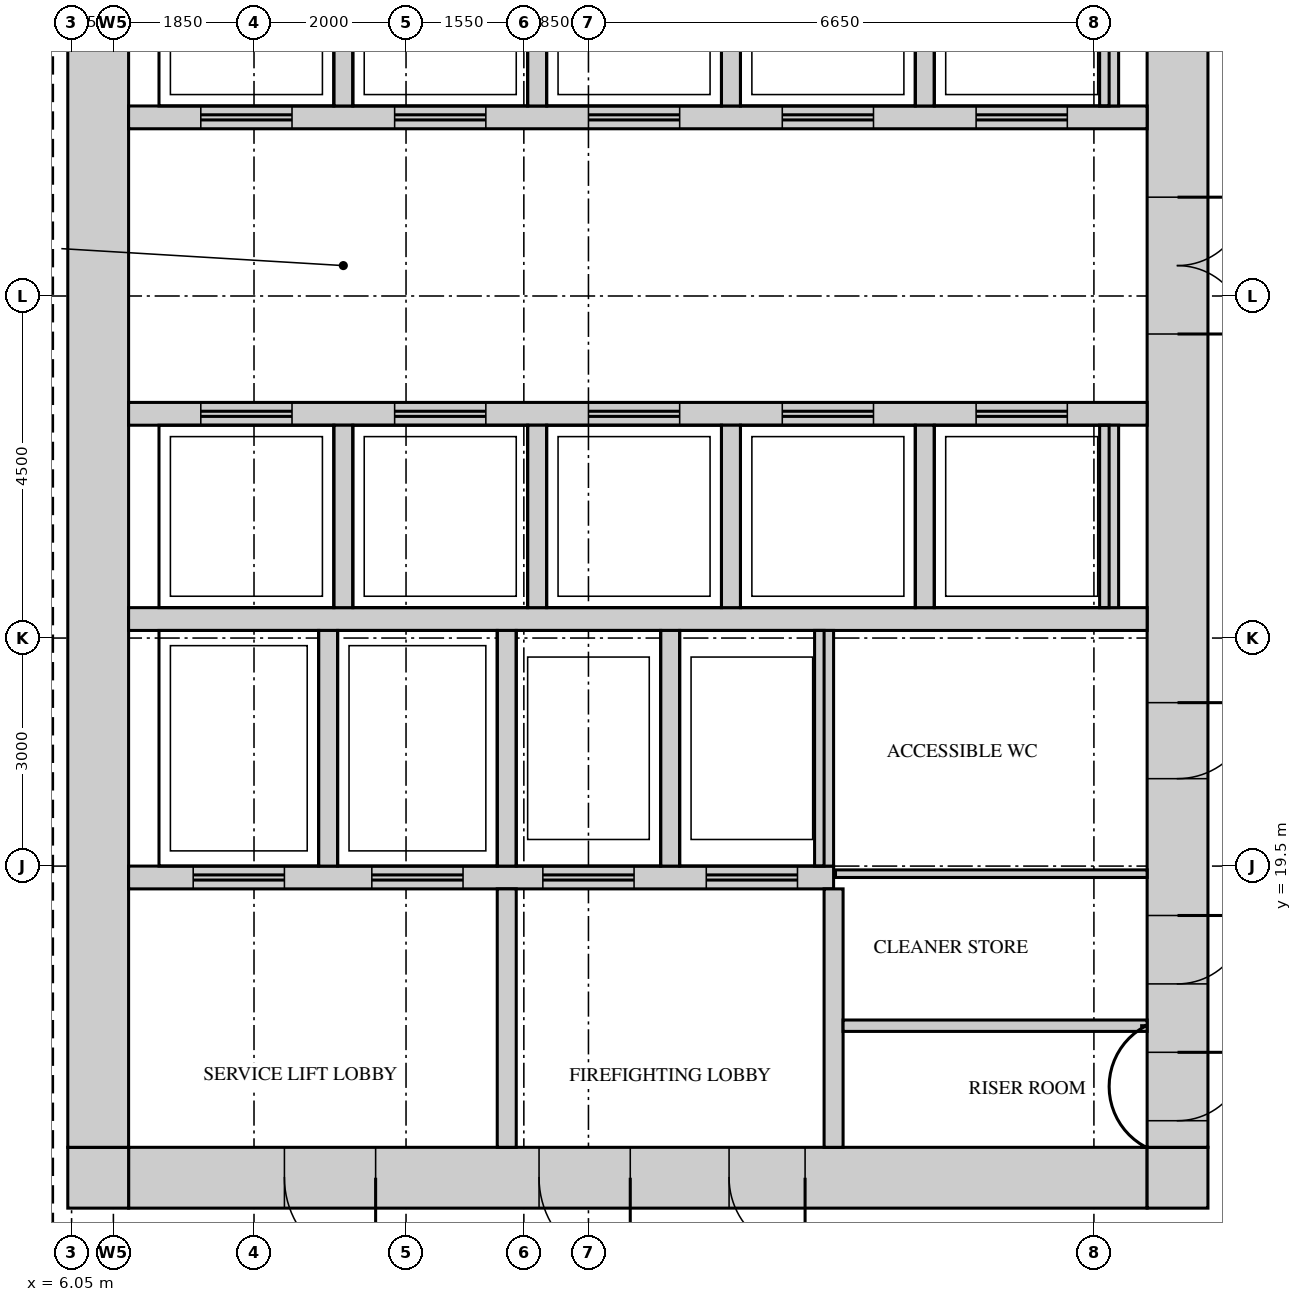
"""IFC4 building model, lengths in metres.
Left out: names, types, materials, properties, quantities, classifications, styles, units other than length and angle.
Written with IfcOpenShell. Run it as: python <this file> out.ifc"""

import sys

from ifc_helpers import new_model, si_unit, direction, frame, frame_2d, origin, place, context, subcontext, project, spatial, rectangle, extrude, source, transform, mapped, element, fill, save


model = new_model("IFC4")
c1 = context("Model", 3, precision=1e-05, world=origin(), true_north=direction((0.0, 1.0)))
c2 = subcontext(c1, "Body", "Model", "MODEL_VIEW")
j1 = project(units=[si_unit("LENGTHUNIT", "METRE"), si_unit("PLANEANGLEUNIT", "RADIAN")], contexts=[c1])
p1 = place(None, origin())
s1 = spatial("IfcSite", under=j1, at=p1, CompositionType="ELEMENT")
p2 = place(p1, origin())
s2 = spatial("IfcBuilding", under=s1, at=p2, CompositionType="ELEMENT")
p3 = place(p2, frame((0.0, 0.0, 188.7)))
s3 = spatial("IfcBuildingStorey", under=s2, at=p3, CompositionType="ELEMENT", Elevation=188.7)
m1 = source(origin(), c2, "Body", "SweptSolid", [
    extrude(rectangle(XDim=13.4, YDim=0.8, at=frame_2d((6.7, 0.0))), origin(), (0.0, 0.0, 1.0), 3.75),
])
p4 = place(p3, frame((6.8, 15.4, 0.0), z_axis=(0.0, 0.0, 1.0), x_axis=(1.0, 0.0, 0.0)))
e1 = element("IfcWall", 1, at=p4, inside=s3, PredefinedType="SHEAR", context=c2, shape_type="MappedRepresentation", body=[
    mapped(m1, transform((0.0, 0.0, 0.0))),
])
m2 = source(origin(), c2, "Body", "SweptSolid", [
    extrude(rectangle(XDim=1.2, YDim=2.1, at=frame_2d((0.6, 1.05))), frame((0.0, 0.41, 0.0), z_axis=(0.0, -1.0, 0.0), x_axis=(1.0, 0.0, 0.0)), (0.0, 0.0, 1.0), 0.82),
])
p5 = place(p4, frame((5.4, 0.0, 0.0)))
e2 = element("IfcOpeningElement", 2, at=p5, cuts=e1, PredefinedType="OPENING", context=c2, shape_type="MappedRepresentation", body=[
    mapped(m2, transform((0.0, 0.0, 0.0))),
])
p6 = place(p4, frame((2.05, 0.0, 0.0)))
e3 = element("IfcOpeningElement", 3, at=p6, cuts=e1, PredefinedType="OPENING", context=c2, shape_type="MappedRepresentation", body=[
    mapped(m2, transform((0.0, 0.0, 0.0))),
])
m3 = source(origin(), c2, "Body", "SweptSolid", [
    extrude(rectangle(XDim=1.0, YDim=2.1, at=frame_2d((0.5, 1.05))), frame((0.0, 0.41, 0.0), z_axis=(0.0, -1.0, 0.0), x_axis=(1.0, 0.0, 0.0)), (0.0, 0.0, 1.0), 0.82),
])
p7 = place(p4, frame((7.9, 0.0, 0.0)))
e4 = element("IfcOpeningElement", 4, at=p7, cuts=e1, PredefinedType="OPENING", context=c2, shape_type="MappedRepresentation", body=[
    mapped(m3, transform((0.0, 0.0, 0.0))),
])
m4 = source(origin(), c2, "Body", "SweptSolid", [
    extrude(rectangle(XDim=0.8, YDim=0.8, at=frame_2d((0.4, 0.0))), origin(), (0.0, 0.0, 1.0), 3.75),
])
for number, where, z_axis, x_axis in (
    (5, (20.2, 15.4, 0.0), (0.0, 0.0, 1.0), (1.0, 0.0, 0.0)),
    (6, (6.0, 15.4, 0.0), (0.0, 0.0, 1.0), (1.0, 0.0, 0.0)),
):
    element("IfcWall", number, at=place(p3, frame(where, z_axis=z_axis, x_axis=x_axis)), inside=s3, PredefinedType="SHEAR", context=c2, shape_type="MappedRepresentation", body=[
        mapped(m4, transform((0.0, 0.0, 0.0))),
    ])
m5 = source(origin(), c2, "Body", "SweptSolid", [
    extrude(rectangle(XDim=22.4, YDim=0.8, at=frame_2d((11.2, 0.0))), origin(), (0.0, 0.0, 1.0), 3.75),
])
p8 = place(p3, frame((20.6, 15.8, 0.0), z_axis=(0.0, 0.0, 1.0), x_axis=(0.0, 1.0, 0.0)))
e7 = element("IfcWall", 7, at=p8, inside=s3, PredefinedType="SHEAR", context=c2, shape_type="MappedRepresentation", body=[
    mapped(m5, transform((0.0, 0.0, 0.0))),
])
m6 = source(origin(), c2, "Body", "SweptSolid", [
    extrude(rectangle(XDim=1.8, YDim=2.1, at=frame_2d((0.9, 1.05))), frame((0.0, 0.41, 0.0), z_axis=(0.0, -1.0, 0.0), x_axis=(1.0, 0.0, 0.0)), (0.0, 0.0, 1.0), 0.82),
])
p9 = place(p8, frame((10.7, 0.0, 0.0)))
e8 = element("IfcOpeningElement", 8, at=p9, cuts=e7, PredefinedType="OPENING", context=c2, shape_type="MappedRepresentation", body=[
    mapped(m6, transform((0.0, 0.0, 0.0))),
])
m7 = source(origin(), c2, "Body", "SweptSolid", [
    extrude(rectangle(XDim=0.9, YDim=2.1, at=frame_2d((0.45, 1.05))), frame((0.0, 0.41, 0.0), z_axis=(0.0, -1.0, 0.0), x_axis=(1.0, 0.0, 0.0)), (0.0, 0.0, 1.0), 0.82),
])
p10 = place(p8, frame((0.35, 0.0, 0.0)))
e9 = element("IfcOpeningElement", 9, at=p10, cuts=e7, PredefinedType="OPENING", context=c2, shape_type="MappedRepresentation", body=[
    mapped(m7, transform((0.0, 0.0, 0.0))),
])
p11 = place(p8, frame((2.15, 0.0, 0.0)))
e10 = element("IfcOpeningElement", 10, at=p11, cuts=e7, PredefinedType="OPENING", context=c2, shape_type="MappedRepresentation", body=[
    mapped(m7, transform((0.0, 0.0, 0.0))),
])
p12 = place(p8, frame((4.85, 0.0, 0.0)))
e11 = element("IfcOpeningElement", 11, at=p12, cuts=e7, PredefinedType="OPENING", context=c2, shape_type="MappedRepresentation", body=[
    mapped(m3, transform((0.0, 0.0, 0.0))),
])
p13 = place(p3, frame((6.4, 15.8, 0.0), z_axis=(0.0, 0.0, 1.0), x_axis=(0.0, 1.0, 0.0)))
e12 = element("IfcWall", 12, at=p13, inside=s3, PredefinedType="SHEAR", context=c2, shape_type="MappedRepresentation", body=[
    mapped(m5, transform((0.0, 0.0, 0.0))),
])
m8 = source(origin(), c2, "Body", "SweptSolid", [
    extrude(rectangle(XDim=13.4, YDim=0.3, at=frame_2d((6.7, 0.0))), origin(), (0.0, 0.0, 1.0), 3.75),
])
p14 = place(p3, frame((6.8, 22.75, 0.0), z_axis=(0.0, 0.0, 1.0), x_axis=(1.0, 0.0, 0.0)))
e13 = element("IfcWall", 13, at=p14, inside=s3, PredefinedType="STANDARD", context=c2, shape_type="MappedRepresentation", body=[
    mapped(m8, transform((0.0, 0.0, 0.0))),
])
m9 = source(origin(), c2, "Body", "SweptSolid", [
    extrude(rectangle(XDim=9.275, YDim=0.3, at=frame_2d((4.637, 0.0))), origin(), (0.0, 0.0, 1.0), 3.75),
])
p15 = place(p3, frame((6.8, 19.35, 0.0), z_axis=(0.0, 0.0, 1.0), x_axis=(1.0, 0.0, 0.0)))
e14 = element("IfcWall", 14, at=p15, inside=s3, PredefinedType="STANDARD", context=c2, shape_type="MappedRepresentation", body=[
    mapped(m9, transform((0.0, 0.0, 0.0))),
])
m10 = source(origin(), c2, "Body", "SweptSolid", [
    extrude(rectangle(XDim=1.2, YDim=2.1, at=frame_2d((0.6, 1.05))), frame((0.0, 0.16, 0.0), z_axis=(0.0, -1.0, 0.0), x_axis=(1.0, 0.0, 0.0)), (0.0, 0.0, 1.0), 0.32),
])
p16 = place(p15, frame((0.85, 0.0, 0.0)))
e15 = element("IfcOpeningElement", 15, at=p16, cuts=e14, PredefinedType="OPENING", context=c2, shape_type="MappedRepresentation", body=[
    mapped(m10, transform((0.0, 0.0, 0.0))),
])
p17 = place(p15, frame((3.2, 0.0, 0.0)))
e16 = element("IfcOpeningElement", 16, at=p17, cuts=e14, PredefinedType="OPENING", context=c2, shape_type="MappedRepresentation", body=[
    mapped(m10, transform((0.0, 0.0, 0.0))),
])
p18 = place(p15, frame((5.45, 0.0, 0.0)))
e17 = element("IfcOpeningElement", 17, at=p18, cuts=e14, PredefinedType="OPENING", context=c2, shape_type="MappedRepresentation", body=[
    mapped(m10, transform((0.0, 0.0, 0.0))),
])
p19 = place(p15, frame((7.6, 0.0, 0.0)))
e18 = element("IfcOpeningElement", 18, at=p19, cuts=e14, PredefinedType="OPENING", context=c2, shape_type="MappedRepresentation", body=[
    mapped(m10, transform((0.0, 0.0, 0.0))),
])
p20 = place(p3, frame((6.8, 29.35, 0.0), z_axis=(0.0, 0.0, 1.0), x_axis=(1.0, 0.0, 0.0)))
e19 = element("IfcWall", 19, at=p20, inside=s3, PredefinedType="STANDARD", context=c2, shape_type="MappedRepresentation", body=[
    mapped(m8, transform((0.0, 0.0, 0.0))),
])
p21 = place(p20, frame((0.95, 0.0, 0.0)))
e20 = element("IfcOpeningElement", 20, at=p21, cuts=e19, PredefinedType="OPENING", context=c2, shape_type="MappedRepresentation", body=[
    mapped(m10, transform((0.0, 0.0, 0.0))),
])
p22 = place(p20, frame((3.5, 0.0, 0.0)))
e21 = element("IfcOpeningElement", 21, at=p22, cuts=e19, PredefinedType="OPENING", context=c2, shape_type="MappedRepresentation", body=[
    mapped(m10, transform((0.0, 0.0, 0.0))),
])
p23 = place(p20, frame((6.05, 0.0, 0.0)))
e22 = element("IfcOpeningElement", 22, at=p23, cuts=e19, PredefinedType="OPENING", context=c2, shape_type="MappedRepresentation", body=[
    mapped(m10, transform((0.0, 0.0, 0.0))),
])
p24 = place(p20, frame((8.6, 0.0, 0.0)))
e23 = element("IfcOpeningElement", 23, at=p24, cuts=e19, PredefinedType="OPENING", context=c2, shape_type="MappedRepresentation", body=[
    mapped(m10, transform((0.0, 0.0, 0.0))),
])
p25 = place(p20, frame((11.15, 0.0, 0.0)))
e24 = element("IfcOpeningElement", 24, at=p25, cuts=e19, PredefinedType="OPENING", context=c2, shape_type="MappedRepresentation", body=[
    mapped(m10, transform((0.0, 0.0, 0.0))),
])
p26 = place(p3, frame((6.8, 25.45, 0.0), z_axis=(0.0, 0.0, 1.0), x_axis=(1.0, 0.0, 0.0)))
e25 = element("IfcWall", 25, at=p26, inside=s3, PredefinedType="STANDARD", context=c2, shape_type="MappedRepresentation", body=[
    mapped(m8, transform((0.0, 0.0, 0.0))),
])
p27 = place(p26, frame((0.95, 0.0, 0.0)))
e26 = element("IfcOpeningElement", 26, at=p27, cuts=e25, PredefinedType="OPENING", context=c2, shape_type="MappedRepresentation", body=[
    mapped(m10, transform((0.0, 0.0, 0.0))),
])
p28 = place(p26, frame((3.5, 0.0, 0.0)))
e27 = element("IfcOpeningElement", 27, at=p28, cuts=e25, PredefinedType="OPENING", context=c2, shape_type="MappedRepresentation", body=[
    mapped(m10, transform((0.0, 0.0, 0.0))),
])
p29 = place(p26, frame((6.05, 0.0, 0.0)))
e28 = element("IfcOpeningElement", 28, at=p29, cuts=e25, PredefinedType="OPENING", context=c2, shape_type="MappedRepresentation", body=[
    mapped(m10, transform((0.0, 0.0, 0.0))),
])
p30 = place(p26, frame((8.6, 0.0, 0.0)))
e29 = element("IfcOpeningElement", 29, at=p30, cuts=e25, PredefinedType="OPENING", context=c2, shape_type="MappedRepresentation", body=[
    mapped(m10, transform((0.0, 0.0, 0.0))),
])
p31 = place(p26, frame((11.15, 0.0, 0.0)))
e30 = element("IfcOpeningElement", 30, at=p31, cuts=e25, PredefinedType="OPENING", context=c2, shape_type="MappedRepresentation", body=[
    mapped(m10, transform((0.0, 0.0, 0.0))),
])
m11 = source(origin(), c2, "Body", "SweptSolid", [
    extrude(rectangle(XDim=3.1, YDim=0.25, at=frame_2d((1.55, 0.0))), origin(), (0.0, 0.0, 1.0), 3.75),
])
for number, where, z_axis, x_axis in (
    (31, (9.425, 19.5, 0.0), (0.0, 0.0, 1.0), (0.0, 1.0, 0.0)),
    (32, (11.775, 19.5, 0.0), (0.0, 0.0, 1.0), (0.0, 1.0, 0.0)),
    (33, (13.925, 19.5, 0.0), (0.0, 0.0, 1.0), (0.0, 1.0, 0.0)),
    (34, (15.95, 19.5, 0.0), (0.0, 0.0, 1.0), (0.0, 1.0, 0.0)),
):
    element("IfcWall", number, at=place(p3, frame(where, z_axis=z_axis, x_axis=x_axis)), inside=s3, PredefinedType="STANDARD", context=c2, shape_type="MappedRepresentation", body=[
        mapped(m11, transform((0.0, 0.0, 0.0))),
    ])
m12 = source(origin(), c2, "Body", "SweptSolid", [
    extrude(rectangle(XDim=2.4, YDim=0.25, at=frame_2d((1.2, 0.0))), origin(), (0.0, 0.0, 1.0), 3.75),
])
for number, where, z_axis, x_axis in (
    (35, (17.275, 29.5, 0.0), (0.0, 0.0, 1.0), (0.0, 1.0, 0.0)),
    (36, (19.7, 29.5, 0.0), (0.0, 0.0, 1.0), (0.0, 1.0, 0.0)),
    (37, (9.625, 29.5, 0.0), (0.0, 0.0, 1.0), (0.0, 1.0, 0.0)),
    (38, (12.175, 29.5, 0.0), (0.0, 0.0, 1.0), (0.0, 1.0, 0.0)),
    (39, (14.725, 29.5, 0.0), (0.0, 0.0, 1.0), (0.0, 1.0, 0.0)),
):
    element("IfcWall", number, at=place(p3, frame(where, z_axis=z_axis, x_axis=x_axis)), inside=s3, PredefinedType="STANDARD", context=c2, shape_type="MappedRepresentation", body=[
        mapped(m12, transform((0.0, 0.0, 0.0))),
    ])
m13 = source(origin(), c2, "Body", "SweptSolid", [
    extrude(rectangle(XDim=2.4, YDim=0.25, at=frame_2d((1.2, 0.0))), origin(), (0.0, 0.0, 1.0), 3.75),
])
for number, where, z_axis, x_axis in (
    (40, (17.275, 22.9, 0.0), (0.0, 0.0, 1.0), (0.0, 1.0, 0.0)),
    (41, (19.7, 22.9, 0.0), (0.0, 0.0, 1.0), (0.0, 1.0, 0.0)),
    (42, (9.625, 22.9, 0.0), (0.0, 0.0, 1.0), (0.0, 1.0, 0.0)),
    (43, (12.175, 22.9, 0.0), (0.0, 0.0, 1.0), (0.0, 1.0, 0.0)),
    (44, (14.725, 22.9, 0.0), (0.0, 0.0, 1.0), (0.0, 1.0, 0.0)),
):
    element("IfcWall", number, at=place(p3, frame(where, z_axis=z_axis, x_axis=x_axis)), inside=s3, PredefinedType="STANDARD", context=c2, shape_type="MappedRepresentation", body=[
        mapped(m13, transform((0.0, 0.0, 0.0))),
    ])
m14 = source(origin(), c2, "Body", "SweptSolid", [
    extrude(rectangle(XDim=3.4, YDim=0.25, at=frame_2d((1.7, 0.0))), origin(), (0.0, 0.0, 1.0), 3.75),
])
for number, where, z_axis, x_axis in (
    (45, (16.075, 15.8, 0.0), (0.0, 0.0, 1.0), (0.0, 1.0, 0.0)),
    (46, (11.775, 15.8, 0.0), (0.0, 0.0, 1.0), (0.0, 1.0, 0.0)),
):
    element("IfcWall", number, at=place(p3, frame(where, z_axis=z_axis, x_axis=x_axis)), inside=s3, PredefinedType="STANDARD", context=c2, shape_type="MappedRepresentation", body=[
        mapped(m14, transform((0.0, 0.0, 0.0))),
    ])
m15 = source(origin(), c2, "Body", "SweptSolid", [
    extrude(rectangle(XDim=4.0, YDim=0.15, at=frame_2d((2.0, 0.0))), origin(), (0.0, 0.0, 1.0), 3.8),
])
p32 = place(p3, frame((16.2, 17.4, 0.0), z_axis=(0.0, 0.0, 1.0), x_axis=(1.0, 0.0, 0.0)))
e47 = element("IfcWall", 47, at=p32, inside=s3, PredefinedType="PARTITIONING", context=c2, shape_type="MappedRepresentation", body=[
    mapped(m15, transform((0.0, 0.0, 0.0))),
])
m16 = source(origin(), c2, "Body", "SweptSolid", [
    extrude(rectangle(XDim=4.1, YDim=0.1, at=frame_2d((2.05, 0.0))), origin(), (0.0, 0.0, 1.0), 3.8),
])
p33 = place(p3, frame((16.1, 19.4, 0.0), z_axis=(0.0, 0.0, 1.0), x_axis=(1.0, 0.0, 0.0)))
e48 = element("IfcWall", 48, at=p33, inside=s3, PredefinedType="PARTITIONING", context=c2, shape_type="MappedRepresentation", body=[
    mapped(m16, transform((0.0, 0.0, 0.0))),
])
m17 = source(origin(), c2, "Body", "SweptSolid", [
    extrude(rectangle(XDim=1.8, YDim=2.1, at=frame_2d((0.9, 1.05))), frame((0.0, 0.35, 0.0), z_axis=(0.0, -1.0, 0.0), x_axis=(1.0, 0.0, 0.0)), (0.0, 0.0, 1.0), 0.7),
])
p34 = place(p9, origin())
e49 = element("IfcDoor", 49, at=p34, inside=s3, OperationType="DOUBLE_DOOR_SINGLE_SWING", PredefinedType="DOOR", context=c2, shape_type="MappedRepresentation", body=[
    mapped(m17, transform((0.0, 0.0, 0.0))),
])
fill(e8, e49)
m18 = source(origin(), c2, "Body", "SweptSolid", [
    extrude(rectangle(XDim=0.9, YDim=2.1, at=frame_2d((0.45, 1.05))), frame((0.0, 0.35, 0.0), z_axis=(0.0, -1.0, 0.0), x_axis=(1.0, 0.0, 0.0)), (0.0, 0.0, 1.0), 0.7),
])
p35 = place(p10, origin())
e50 = element("IfcDoor", 50, at=p35, inside=s3, OperationType="SINGLE_SWING_RIGHT", PredefinedType="DOOR", context=c2, shape_type="MappedRepresentation", body=[
    mapped(m18, transform((0.0, 0.0, 0.0))),
])
fill(e9, e50)
p36 = place(p11, origin())
e51 = element("IfcDoor", 51, at=p36, inside=s3, OperationType="SINGLE_SWING_RIGHT", PredefinedType="DOOR", context=c2, shape_type="MappedRepresentation", body=[
    mapped(m18, transform((0.0, 0.0, 0.0))),
])
fill(e10, e51)
m19 = source(origin(), c2, "Body", "SweptSolid", [
    extrude(rectangle(XDim=1.0, YDim=2.1, at=frame_2d((0.5, 1.05))), frame((0.0, 0.35, 0.0), z_axis=(0.0, -1.0, 0.0), x_axis=(1.0, 0.0, 0.0)), (0.0, 0.0, 1.0), 0.7),
])
p37 = place(p12, origin())
e52 = element("IfcDoor", 52, at=p37, inside=s3, OperationType="SINGLE_SWING_RIGHT", PredefinedType="DOOR", context=c2, shape_type="MappedRepresentation", body=[
    mapped(m19, transform((0.0, 0.0, 0.0))),
])
fill(e11, e52)
m20 = source(origin(), c2, "Body", "SweptSolid", [
    extrude(rectangle(XDim=1.2, YDim=2.1, at=frame_2d((0.6, 1.05))), frame((0.0, 0.35, 0.0), z_axis=(0.0, -1.0, 0.0), x_axis=(1.0, 0.0, 0.0)), (0.0, 0.0, 1.0), 0.7),
])
p38 = place(p5, origin())
e53 = element("IfcDoor", 53, at=p38, inside=s3, OperationType="SINGLE_SWING_RIGHT", PredefinedType="DOOR", context=c2, shape_type="MappedRepresentation", body=[
    mapped(m20, transform((0.0, 0.0, 0.0))),
])
fill(e2, e53)
p39 = place(p6, origin())
e54 = element("IfcDoor", 54, at=p39, inside=s3, OperationType="SINGLE_SWING_RIGHT", PredefinedType="DOOR", context=c2, shape_type="MappedRepresentation", body=[
    mapped(m20, transform((0.0, 0.0, 0.0))),
])
fill(e3, e54)
p40 = place(p7, origin())
e55 = element("IfcDoor", 55, at=p40, inside=s3, OperationType="SINGLE_SWING_RIGHT", PredefinedType="DOOR", context=c2, shape_type="MappedRepresentation", body=[
    mapped(m19, transform((0.0, 0.0, 0.0))),
])
fill(e4, e55)
m21 = source(origin(), c2, "Body", "SweptSolid", [
    extrude(rectangle(XDim=1.2, YDim=2.1, at=frame_2d((0.6, 1.05))), frame((0.0, 0.025, 0.0), z_axis=(0.0, -1.0, 0.0), x_axis=(1.0, 0.0, 0.0)), (0.0, 0.0, 1.0), 0.05),
])
p41 = place(p27, origin())
e56 = element("IfcDoor", 56, at=p41, inside=s3, OperationType="DOUBLE_DOOR_SLIDING", PredefinedType="DOOR", context=c2, shape_type="MappedRepresentation", body=[
    mapped(m21, transform((0.0, 0.0, 0.0))),
])
fill(e26, e56)
p42 = place(p28, origin())
e57 = element("IfcDoor", 57, at=p42, inside=s3, OperationType="DOUBLE_DOOR_SLIDING", PredefinedType="DOOR", context=c2, shape_type="MappedRepresentation", body=[
    mapped(m21, transform((0.0, 0.0, 0.0))),
])
fill(e27, e57)
p43 = place(p29, origin())
e58 = element("IfcDoor", 58, at=p43, inside=s3, OperationType="DOUBLE_DOOR_SLIDING", PredefinedType="DOOR", context=c2, shape_type="MappedRepresentation", body=[
    mapped(m21, transform((0.0, 0.0, 0.0))),
])
fill(e28, e58)
p44 = place(p30, origin())
e59 = element("IfcDoor", 59, at=p44, inside=s3, OperationType="DOUBLE_DOOR_SLIDING", PredefinedType="DOOR", context=c2, shape_type="MappedRepresentation", body=[
    mapped(m21, transform((0.0, 0.0, 0.0))),
])
fill(e29, e59)
p45 = place(p31, origin())
e60 = element("IfcDoor", 60, at=p45, inside=s3, OperationType="DOUBLE_DOOR_SLIDING", PredefinedType="DOOR", context=c2, shape_type="MappedRepresentation", body=[
    mapped(m21, transform((0.0, 0.0, 0.0))),
])
fill(e30, e60)
p46 = place(p21, origin())
e61 = element("IfcDoor", 61, at=p46, inside=s3, OperationType="DOUBLE_DOOR_SLIDING", PredefinedType="DOOR", context=c2, shape_type="MappedRepresentation", body=[
    mapped(m21, transform((0.0, 0.0, 0.0))),
])
fill(e20, e61)
p47 = place(p22, origin())
e62 = element("IfcDoor", 62, at=p47, inside=s3, OperationType="DOUBLE_DOOR_SLIDING", PredefinedType="DOOR", context=c2, shape_type="MappedRepresentation", body=[
    mapped(m21, transform((0.0, 0.0, 0.0))),
])
fill(e21, e62)
p48 = place(p23, origin())
e63 = element("IfcDoor", 63, at=p48, inside=s3, OperationType="DOUBLE_DOOR_SLIDING", PredefinedType="DOOR", context=c2, shape_type="MappedRepresentation", body=[
    mapped(m21, transform((0.0, 0.0, 0.0))),
])
fill(e22, e63)
p49 = place(p24, origin())
e64 = element("IfcDoor", 64, at=p49, inside=s3, OperationType="DOUBLE_DOOR_SLIDING", PredefinedType="DOOR", context=c2, shape_type="MappedRepresentation", body=[
    mapped(m21, transform((0.0, 0.0, 0.0))),
])
fill(e23, e64)
p50 = place(p25, origin())
e65 = element("IfcDoor", 65, at=p50, inside=s3, OperationType="DOUBLE_DOOR_SLIDING", PredefinedType="DOOR", context=c2, shape_type="MappedRepresentation", body=[
    mapped(m21, transform((0.0, 0.0, 0.0))),
])
fill(e24, e65)
p51 = place(p16, origin())
e66 = element("IfcDoor", 66, at=p51, inside=s3, OperationType="DOUBLE_DOOR_SLIDING", PredefinedType="DOOR", context=c2, shape_type="MappedRepresentation", body=[
    mapped(m21, transform((0.0, 0.0, 0.0))),
])
fill(e15, e66)
p52 = place(p17, origin())
e67 = element("IfcDoor", 67, at=p52, inside=s3, OperationType="DOUBLE_DOOR_SLIDING", PredefinedType="DOOR", context=c2, shape_type="MappedRepresentation", body=[
    mapped(m21, transform((0.0, 0.0, 0.0))),
])
fill(e16, e67)
p53 = place(p18, origin())
e68 = element("IfcDoor", 68, at=p53, inside=s3, OperationType="DOUBLE_DOOR_SLIDING", PredefinedType="DOOR", context=c2, shape_type="MappedRepresentation", body=[
    mapped(m21, transform((0.0, 0.0, 0.0))),
])
fill(e17, e68)
p54 = place(p19, origin())
e69 = element("IfcDoor", 69, at=p54, inside=s3, OperationType="DOUBLE_DOOR_SLIDING", PredefinedType="DOOR", context=c2, shape_type="MappedRepresentation", body=[
    mapped(m21, transform((0.0, 0.0, 0.0))),
])
fill(e18, e69)
save(model, sys.argv[1])
